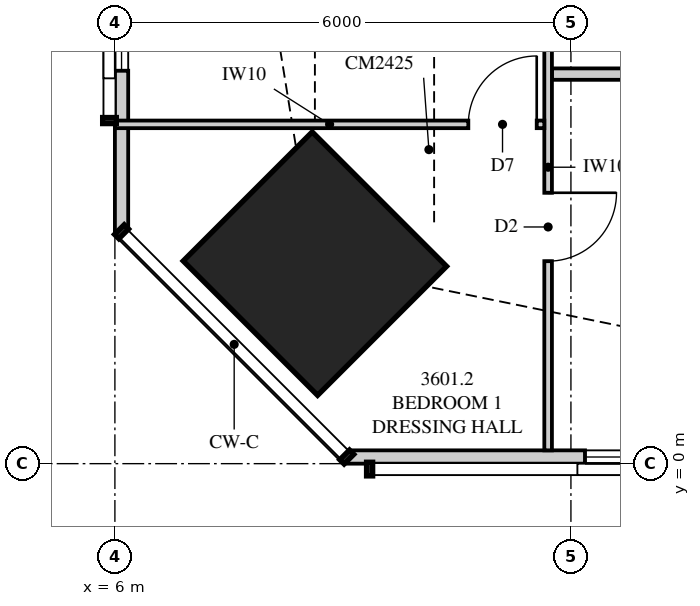
"""IFC4 building model, lengths in metres.
Left out: names, types, materials, properties, quantities, classifications, styles, units other than length and angle.
Written with IfcOpenShell. Run it as: python <this file> out.ifc"""

import sys

from ifc_helpers import new_model, si_unit, direction, frame, frame_2d, origin, origin_2d, place, context, subcontext, project, spatial, polyline, rectangle, outline, extrude, element, fill, save


model = new_model("IFC4")
c1 = context("Model", 3, precision=1e-05, world=origin(), true_north=direction((0.0, 1.0)))
c2 = subcontext(c1, "Body", "Model", "MODEL_VIEW")
j1 = project(units=[si_unit("LENGTHUNIT", "METRE"), si_unit("PLANEANGLEUNIT", "RADIAN")], contexts=[c1])
p1 = place(None, origin())
s1 = spatial("IfcSite", under=j1, at=p1, CompositionType="ELEMENT")
p2 = place(p1, origin())
s2 = spatial("IfcBuilding", under=s1, at=p2, CompositionType="ELEMENT")
p3 = place(p2, frame((0.0, 0.0, 131.65)))
s3 = spatial("IfcBuildingStorey", under=s2, at=p3, CompositionType="ELEMENT", Elevation=131.65)
p4 = place(p3, frame((8.631, 2.631, 0.0), z_axis=(0.0, 0.0, 1.0), x_axis=(0.707106781187, 0.707106781187, 0.0)))
e1 = element("IfcColumn", 1, at=p4, inside=s3, PredefinedType="COLUMN", context=c2, shape_type="SweptSolid", body=[
    extrude(rectangle(XDim=2.4, YDim=2.5, at=origin_2d()), origin(), (0.0, 0.0, 1.0), 3.35),
])
p5 = place(p3, frame((9.051, 0.087, 0.0), z_axis=(0.0, 0.0, 1.0), x_axis=(1.0, 0.0, 0.0)))
e2 = element("IfcWall", 2, at=p5, inside=s3, PredefinedType="SOLIDWALL", context=c2, shape_type="SweptSolid", body=[
    extrude(outline(polyline([(0.0, 0.0), (22.324, 0.0), (22.324, 2.15), (7.824, 2.15), (7.824, 3.11), (7.666, 3.11), (7.666, 2.15), (7.62, 2.15), (7.62, 3.11), (0.0, 3.11), (0.0, 0.0)])), frame((0.0, 0.087, 0.0), z_axis=(0.0, -1.0, 0.0), x_axis=(1.0, 0.0, 0.0)), (0.0, 0.0, 1.0), 0.175),
])
p6 = place(p5, frame((3.134, 0.0, 0.4)))
e3 = element("IfcOpeningElement", 3, at=p6, cuts=e2, PredefinedType="OPENING", context=c2, shape_type="SweptSolid", body=[
    extrude(rectangle(XDim=1.8, YDim=1.7, at=frame_2d((0.9, 0.85))), frame((0.0, 0.097, 0.0), z_axis=(0.0, -1.0, 0.0), x_axis=(1.0, 0.0, 0.0)), (0.0, 0.0, 1.0), 0.195),
])
p7 = place(p5, frame((10.706, 0.0, 0.4)))
e4 = element("IfcOpeningElement", 4, at=p7, cuts=e2, PredefinedType="OPENING", context=c2, shape_type="SweptSolid", body=[
    extrude(rectangle(XDim=1.8, YDim=1.7, at=frame_2d((0.9, 0.85))), frame((0.0, 0.097, 0.0), z_axis=(0.0, -1.0, 0.0), x_axis=(1.0, 0.0, 0.0)), (0.0, 0.0, 1.0), 0.195),
])
p8 = place(p5, frame((13.874, 0.0, 0.4)))
e5 = element("IfcOpeningElement", 5, at=p8, cuts=e2, PredefinedType="OPENING", context=c2, shape_type="SweptSolid", body=[
    extrude(rectangle(XDim=1.8, YDim=1.7, at=frame_2d((0.9, 0.85))), frame((0.0, 0.097, 0.0), z_axis=(0.0, -1.0, 0.0), x_axis=(1.0, 0.0, 0.0)), (0.0, 0.0, 1.0), 0.195),
])
p9 = place(p3, frame((6.087, 16.625, 0.0), z_axis=(0.0, 0.0, 1.0), x_axis=(0.0, -1.0, 0.0)))
e6 = element("IfcWall", 6, at=p9, inside=s3, PredefinedType="SOLIDWALL", context=c2, shape_type="SweptSolid", body=[
    extrude(outline(polyline([(0.0, 0.0), (13.574, 0.0), (13.574, 3.11), (3.844, 3.11), (3.844, 2.15), (3.751, 2.15), (3.751, 3.11), (3.625, 3.11), (3.625, 2.15), (0.0, 2.15), (0.0, 0.0)])), frame((0.0, 0.087, 0.0), z_axis=(0.0, -1.0, 0.0), x_axis=(1.0, 0.0, 0.0)), (0.0, 0.0, 1.0), 0.175),
])
p10 = place(p9, frame((6.5, 0.0, 0.4)))
e7 = element("IfcOpeningElement", 7, at=p10, cuts=e6, PredefinedType="OPENING", context=c2, shape_type="SweptSolid", body=[
    extrude(rectangle(XDim=1.8, YDim=1.7, at=frame_2d((0.9, 0.85))), frame((0.0, 0.097, 0.0), z_axis=(0.0, -1.0, 0.0), x_axis=(1.0, 0.0, 0.0)), (0.0, 0.0, 1.0), 0.195),
])
p11 = place(p9, frame((9.656, 0.0, 0.4)))
e8 = element("IfcOpeningElement", 8, at=p11, cuts=e6, PredefinedType="OPENING", context=c2, shape_type="SweptSolid", body=[
    extrude(rectangle(XDim=1.8, YDim=1.7, at=frame_2d((0.9, 0.85))), frame((0.0, 0.097, 0.0), z_axis=(0.0, -1.0, 0.0), x_axis=(1.0, 0.0, 0.0)), (0.0, 0.0, 1.0), 0.195),
])
p12 = place(p3, frame((11.7, 0.175, 0.0), z_axis=(0.0, 0.0, 1.0), x_axis=(0.0, 1.0, 0.0)))
e9 = element("IfcWall", 9, at=p12, inside=s3, PredefinedType="PARTITIONING", context=c2, shape_type="SweptSolid", body=[
    extrude(outline(polyline([(0.0, 0.0), (7.45, 0.0), (7.45, 3.11), (2.708, 3.11), (2.708, 2.15), (0.953, 2.15), (0.953, 3.11), (0.0, 3.11), (0.0, 0.0)])), frame((0.0, 0.05, 0.0), z_axis=(0.0, -1.0, 0.0), x_axis=(1.0, 0.0, 0.0)), (0.0, 0.0, 1.0), 0.1),
])
p13 = place(p12, frame((2.489, 0.0, 0.0)))
e10 = element("IfcOpeningElement", 10, at=p13, cuts=e9, PredefinedType="OPENING", context=c2, shape_type="SweptSolid", body=[
    extrude(rectangle(XDim=0.9, YDim=2.1, at=frame_2d((0.45, 1.05))), frame((0.0, 0.06, 0.0), z_axis=(0.0, -1.0, 0.0), x_axis=(1.0, 0.0, 0.0)), (0.0, 0.0, 1.0), 0.12),
])
p14 = place(p12, frame((5.419, 0.0, 0.0)))
e11 = element("IfcOpeningElement", 11, at=p14, cuts=e9, PredefinedType="OPENING", context=c2, shape_type="SweptSolid", body=[
    extrude(rectangle(XDim=0.9, YDim=2.1, at=frame_2d((0.45, 1.05))), frame((0.0, 0.06, 0.0), z_axis=(0.0, -1.0, 0.0), x_axis=(1.0, 0.0, 0.0)), (0.0, 0.0, 1.0), 0.12),
])
p15 = place(p3, frame((6.0, 4.464, 0.0), z_axis=(0.0, 0.0, 1.0), x_axis=(1.0, 0.0, 0.0)))
e12 = element("IfcWall", 12, at=p15, inside=s3, PredefinedType="PARTITIONING", context=c2, shape_type="SweptSolid", body=[
    extrude(outline(polyline([(0.0, 0.0), (5.65, 0.0), (5.65, 3.11), (5.46, 3.11), (5.46, 2.51), (3.206, 2.51), (3.206, 2.15), (1.463, 2.15), (1.463, 3.11), (0.0, 3.11), (0.0, 0.0)])), frame((0.0, 0.05, 0.0), z_axis=(0.0, -1.0, 0.0), x_axis=(1.0, 0.0, 0.0)), (0.0, 0.0, 1.0), 0.1),
])
p16 = place(p15, frame((4.65, 0.0, 0.0)))
e13 = element("IfcOpeningElement", 13, at=p16, cuts=e12, PredefinedType="OPENING", context=c2, shape_type="SweptSolid", body=[
    extrude(rectangle(XDim=0.9, YDim=2.1, at=frame_2d((0.45, 1.05))), frame((0.0, 0.06, 0.0), z_axis=(0.0, -1.0, 0.0), x_axis=(1.0, 0.0, 0.0)), (0.0, 0.0, 1.0), 0.12),
])
p17 = place(p3, frame((11.75, 5.125, 0.0), z_axis=(0.0, 0.0, 1.0), x_axis=(1.0, 0.0, 0.0)))
e14 = element("IfcWall", 14, at=p17, inside=s3, PredefinedType="PLUMBINGWALL", context=c2, shape_type="SweptSolid", body=[
    extrude(outline(polyline([(0.0, 0.0), (5.9, 0.0), (5.9, 3.11), (5.438, 3.11), (5.438, 2.541), (4.812, 2.541), (4.812, 3.11), (0.0, 3.11), (0.0, 0.0)])), frame((0.0, 0.075, 0.0), z_axis=(0.0, -1.0, 0.0), x_axis=(1.0, 0.0, 0.0)), (0.0, 0.0, 1.0), 0.15),
])
p18 = place(p17, frame((4.6, 0.0, 0.0)))
e15 = element("IfcOpeningElement", 15, at=p18, cuts=e14, PredefinedType="OPENING", context=c2, shape_type="SweptSolid", body=[
    extrude(rectangle(XDim=0.9, YDim=2.1, at=frame_2d((0.45, 1.05))), frame((0.0, 0.085, 0.0), z_axis=(0.0, -1.0, 0.0), x_axis=(1.0, 0.0, 0.0)), (0.0, 0.0, 1.0), 0.17),
])
p19 = place(p6, origin())
e16 = element("IfcWindow", 16, at=p19, inside=s3, PartitioningType="SINGLE_PANEL", PredefinedType="WINDOW", context=c2, shape_type="SweptSolid", body=[
    extrude(rectangle(XDim=1.8, YDim=1.7, at=frame_2d((0.9, 0.85))), frame((0.0, 0.03, 0.0), z_axis=(0.0, -1.0, 0.0), x_axis=(1.0, 0.0, 0.0)), (0.0, 0.0, 1.0), 0.06),
])
fill(e3, e16)
p20 = place(p11, origin())
e17 = element("IfcWindow", 17, at=p20, inside=s3, PartitioningType="SINGLE_PANEL", PredefinedType="WINDOW", context=c2, shape_type="SweptSolid", body=[
    extrude(rectangle(XDim=1.8, YDim=1.7, at=frame_2d((0.9, 0.85))), frame((0.0, 0.03, 0.0), z_axis=(0.0, -1.0, 0.0), x_axis=(1.0, 0.0, 0.0)), (0.0, 0.0, 1.0), 0.06),
])
fill(e8, e17)
p21 = place(p16, origin())
e18 = element("IfcDoor", 18, at=p21, inside=s3, OperationType="SINGLE_SWING_RIGHT", PredefinedType="DOOR", context=c2, shape_type="SweptSolid", body=[
    extrude(rectangle(XDim=0.9, YDim=2.1, at=frame_2d((0.45, 1.05))), frame((0.0, 0.025, 0.0), z_axis=(0.0, -1.0, 0.0), x_axis=(1.0, 0.0, 0.0)), (0.0, 0.0, 1.0), 0.05),
])
fill(e13, e18)
p22 = place(p13, frame((0.9, 0.0, 0.0), z_axis=(0.0, 0.0, 1.0), x_axis=(-1.0, 0.0, 0.0)))
e19 = element("IfcDoor", 19, at=p22, inside=s3, OperationType="SINGLE_SWING_LEFT", PredefinedType="DOOR", context=c2, shape_type="SweptSolid", body=[
    extrude(rectangle(XDim=0.9, YDim=2.1, at=frame_2d((0.45, 1.05))), frame((0.0, 0.025, 0.0), z_axis=(0.0, -1.0, 0.0), x_axis=(1.0, 0.0, 0.0)), (0.0, 0.0, 1.0), 0.05),
])
fill(e10, e19)
save(model, sys.argv[1])
